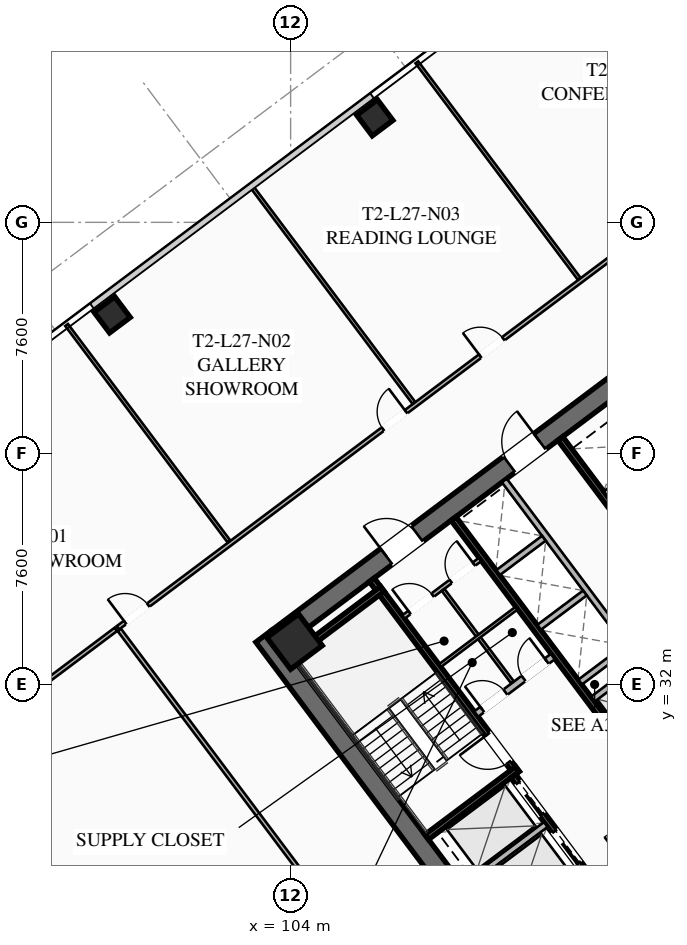
"""IFC4 building model, lengths in metres.
Left out: names, types, materials, properties, quantities, classifications, styles, units other than length and angle.
Written with IfcOpenShell. Run it as: python <this file> out.ifc"""

import sys

from ifc_helpers import new_model, si_unit, direction, frame, frame_2d, origin, origin_2d, place, context, subcontext, project, spatial, rectangle, hollow_rectangle, extrude, element, fill, save


model = new_model("IFC4")
c1 = context("Model", 3, precision=1e-05, world=origin(), true_north=direction((0.0, 1.0)))
c2 = subcontext(c1, "Body", "Model", "MODEL_VIEW")
j1 = project(units=[si_unit("LENGTHUNIT", "METRE"), si_unit("PLANEANGLEUNIT", "RADIAN")], contexts=[c1])
p1 = place(None, origin())
s1 = spatial("IfcSite", under=j1, at=p1, CompositionType="ELEMENT")
p2 = place(p1, origin())
s2 = spatial("IfcBuilding", under=s1, at=p2, CompositionType="ELEMENT")
p3 = place(p2, frame((0.0, 0.0, 102.7)))
s3 = spatial("IfcBuildingStorey", under=s2, at=p3, CompositionType="ELEMENT", Elevation=102.7)
p4 = place(p3, frame((112.476, 21.107, 0.0), z_axis=(0.0, 0.0, 1.0), x_axis=(-0.600005007985, 0.799996243986, 0.0)))
e1 = element("IfcWall", 1, at=p4, inside=s3, PredefinedType="SHEAR", context=c2, shape_type="SweptSolid", body=[
    extrude(rectangle(XDim=15.6, YDim=0.65, at=frame_2d((7.8, 0.0))), origin(), (0.0, 0.0, 1.0), 3.55),
])
p5 = place(p3, frame((124.429, 30.478, 0.0), z_axis=(0.0, 0.0, 1.0), x_axis=(-0.799998028465, -0.600002628705, 0.0)))
e2 = element("IfcWall", 2, at=p5, inside=s3, PredefinedType="SHEAR", context=c2, shape_type="SweptSolid", body=[
    extrude(rectangle(XDim=14.86, YDim=0.65, at=frame_2d((7.43, 0.0))), origin(), (0.0, 0.0, 1.0), 3.55),
])
p6 = place(p5, frame((9.13, 0.0, 0.0)))
e3 = element("IfcOpeningElement", 3, at=p6, cuts=e2, PredefinedType="OPENING", context=c2, shape_type="SweptSolid", body=[
    extrude(rectangle(XDim=1.25, YDim=2.25, at=frame_2d((0.625, 1.125))), frame((0.0, 0.335, 0.0), z_axis=(0.0, -1.0, 0.0), x_axis=(1.0, 0.0, 0.0)), (0.0, 0.0, 1.0), 0.67),
])
p7 = place(p5, frame((4.08, 0.0, 0.0)))
e4 = element("IfcOpeningElement", 4, at=p7, cuts=e2, PredefinedType="OPENING", context=c2, shape_type="SweptSolid", body=[
    extrude(rectangle(XDim=1.25, YDim=2.25, at=frame_2d((0.625, 1.125))), frame((0.0, 0.335, 0.0), z_axis=(0.0, -1.0, 0.0), x_axis=(1.0, 0.0, 0.0)), (0.0, 0.0, 1.0), 0.67),
])
p8 = place(p3, frame((103.571, 33.522, 0.0), z_axis=(0.0, 0.0, 1.0), x_axis=(0.799998028465, 0.600002628705, 0.0)))
e5 = element("IfcWall", 5, at=p8, inside=s3, PredefinedType="SHEAR", context=c2, shape_type="SweptSolid", body=[
    extrude(rectangle(XDim=14.86, YDim=0.65, at=frame_2d((7.43, 0.0))), origin(), (0.0, 0.0, 1.0), 3.55),
])
p9 = place(p8, frame((4.48, 0.0, 0.0)))
e6 = element("IfcOpeningElement", 6, at=p9, cuts=e5, PredefinedType="OPENING", context=c2, shape_type="SweptSolid", body=[
    extrude(rectangle(XDim=1.25, YDim=2.25, at=frame_2d((0.625, 1.125))), frame((0.0, 0.335, 0.0), z_axis=(0.0, -1.0, 0.0), x_axis=(1.0, 0.0, 0.0)), (0.0, 0.0, 1.0), 0.67),
])
p10 = place(p8, frame((9.53, 0.0, 0.0)))
e7 = element("IfcOpeningElement", 7, at=p10, cuts=e5, PredefinedType="OPENING", context=c2, shape_type="SweptSolid", body=[
    extrude(rectangle(XDim=1.25, YDim=2.25, at=frame_2d((0.625, 1.125))), frame((0.0, 0.335, 0.0), z_axis=(0.0, -1.0, 0.0), x_axis=(1.0, 0.0, 0.0)), (0.0, 0.0, 1.0), 0.67),
])
p11 = place(p3, frame((104.13, 33.41, 0.0), z_axis=(0.0, 0.0, 1.0), x_axis=(0.799999996291, 0.600000004945, 0.0)))
e8 = element("IfcColumn", 8, at=p11, inside=s3, PredefinedType="COLUMN", context=c2, shape_type="SweptSolid", body=[
    extrude(hollow_rectangle(XDim=1.3, YDim=1.3, WallThickness=0.05, at=origin_2d()), origin(), (0.0, 0.0, 1.0), 3.35),
])
for number, where, z_axis, x_axis in (
    (9, (106.77, 50.64, 0.0), (0.0, 0.0, 1.0), (0.8, 0.6, 0.0)),
    (10, (98.13, 44.16, 0.0), (0.0, 0.0, 1.0), (0.8, 0.6, 0.0)),
):
    element("IfcColumn", number, at=place(p3, frame(where, z_axis=z_axis, x_axis=x_axis)), inside=s3, PredefinedType="COLUMN", context=c2, shape_type="SweptSolid", body=[
        extrude(hollow_rectangle(XDim=0.85, YDim=0.85, WallThickness=0.035, at=origin_2d()), origin(), (0.0, 0.0, 1.0), 3.35),
    ])
p12 = place(p3, frame((111.44, 29.08, 0.0), z_axis=(0.0, 0.0, 1.0), x_axis=(-0.600009827119, 0.799992629566, 0.0)))
e11 = element("IfcWall", 11, at=p12, inside=s3, PredefinedType="SHEAR", context=c2, shape_type="SweptSolid", body=[
    extrude(rectangle(XDim=7.95, YDim=0.2, at=frame_2d((3.975, 0.0))), origin(), (0.0, 0.0, 1.0), 3.35),
])
p13 = place(p12, frame((0.45, 0.0, 0.0)))
e12 = element("IfcOpeningElement", 12, at=p13, cuts=e11, PredefinedType="OPENING", context=c2, shape_type="SweptSolid", body=[
    extrude(rectangle(XDim=1.15, YDim=2.2, at=frame_2d((0.575, 1.1))), frame((0.0, 0.11, 0.0), z_axis=(0.0, -1.0, 0.0), x_axis=(1.0, 0.0, 0.0)), (0.0, 0.0, 1.0), 0.22),
])
for number, where, z_axis, x_axis in (
    (13, (108.476, 26.982, 0.0), (0.0, 0.0, 1.0), (0.8, 0.6, 0.0)),
    (14, (104.036, 32.902, 0.0), (0.0, 0.0, 1.0), (0.8, 0.6, 0.0)),
):
    element("IfcWall", number, at=place(p3, frame(where, z_axis=z_axis, x_axis=x_axis)), inside=s3, PredefinedType="SHEAR", context=c2, shape_type="SweptSolid", body=[
        extrude(rectangle(XDim=3.73, YDim=0.2, at=frame_2d((1.865, 0.0))), origin(), (0.0, 0.0, 1.0), 3.35),
    ])
p14 = place(p3, frame((117.938, 26.016, 0.0), z_axis=(0.0, 0.0, 1.0), x_axis=(-0.600005463273, 0.799995902516, 0.0)))
e15 = element("IfcWall", 15, at=p14, inside=s3, PredefinedType="SHEAR", context=c2, shape_type="SweptSolid", body=[
    extrude(rectangle(XDim=14.3, YDim=0.2, at=frame_2d((7.15, 0.0))), origin(), (0.0, 0.0, 1.0), 3.35),
])
p15 = place(p3, frame((110.104, 31.028, 0.0), z_axis=(0.0, 0.0, 1.0), x_axis=(0.800018601094, 0.59997519774, 0.0)))
e16 = element("IfcWall", 16, at=p15, inside=s3, PredefinedType="SOLIDWALL", context=c2, shape_type="SweptSolid", body=[
    extrude(rectangle(XDim=3.15, YDim=0.22, at=frame_2d((1.575, 0.0))), origin(), (0.0, 0.0, 1.0), 2.703),
])
p16 = place(p15, frame((0.25, 0.0, 0.0)))
e17 = element("IfcOpeningElement", 17, at=p16, cuts=e16, PredefinedType="OPENING", context=c2, shape_type="SweptSolid", body=[
    extrude(rectangle(XDim=0.95, YDim=2.05, at=frame_2d((0.475, 1.025))), frame((0.0, 0.12, 0.0), z_axis=(0.0, -1.0, 0.0), x_axis=(1.0, 0.0, 0.0)), (0.0, 0.0, 1.0), 0.24),
])
p17 = place(p15, frame((1.95, 0.0, 0.0)))
e18 = element("IfcOpeningElement", 18, at=p17, cuts=e16, PredefinedType="OPENING", context=c2, shape_type="SweptSolid", body=[
    extrude(rectangle(XDim=0.95, YDim=2.05, at=frame_2d((0.475, 1.025))), frame((0.0, 0.12, 0.0), z_axis=(0.0, -1.0, 0.0), x_axis=(1.0, 0.0, 0.0)), (0.0, 0.0, 1.0), 0.24),
])
p18 = place(p3, frame((114.316, 25.412, 0.0), z_axis=(0.0, 0.0, 1.0), x_axis=(0.800018601094, 0.59997519774, 0.0)))
e19 = element("IfcWall", 19, at=p18, inside=s3, PredefinedType="SOLIDWALL", context=c2, shape_type="SweptSolid", body=[
    extrude(rectangle(XDim=3.15, YDim=0.22, at=frame_2d((1.575, 0.0))), origin(), (0.0, 0.0, 1.0), 2.703),
])
p19 = place(p18, frame((0.95, 0.0, 0.0)))
e20 = element("IfcOpeningElement", 20, at=p19, cuts=e19, PredefinedType="OPENING", context=c2, shape_type="SweptSolid", body=[
    extrude(rectangle(XDim=1.25, YDim=2.25, at=frame_2d((0.625, 1.125))), frame((0.0, 0.12, 0.0), z_axis=(0.0, -1.0, 0.0), x_axis=(1.0, 0.0, 0.0)), (0.0, 0.0, 1.0), 0.24),
])
p20 = place(p3, frame((115.13, 23.91, 0.0), z_axis=(0.0, 0.0, 1.0), x_axis=(-0.599975393228, 0.800018454488, 0.0)))
e21 = element("IfcWall", 21, at=p20, inside=s3, PredefinedType="SHEAR", context=c2, shape_type="SweptSolid", body=[
    extrude(rectangle(XDim=6.35, YDim=0.2, at=frame_2d((3.175, 0.0))), origin(), (0.0, 0.0, 1.0), 3.35),
])
p21 = place(p20, frame((4.775, 0.0, 0.0)))
e22 = element("IfcOpeningElement", 22, at=p21, cuts=e21, PredefinedType="OPENING", context=c2, shape_type="SweptSolid", body=[
    extrude(rectangle(XDim=1.3, YDim=2.25, at=frame_2d((0.65, 1.125))), frame((0.0, 0.11, 0.0), z_axis=(0.0, -1.0, 0.0), x_axis=(1.0, 0.0, 0.0)), (0.0, 0.0, 1.0), 0.22),
])
p22 = place(p20, frame((2.775, 0.0, 0.0)))
e23 = element("IfcOpeningElement", 23, at=p22, cuts=e21, PredefinedType="OPENING", context=c2, shape_type="SweptSolid", body=[
    extrude(rectangle(XDim=1.3, YDim=2.25, at=frame_2d((0.65, 1.125))), frame((0.0, 0.11, 0.0), z_axis=(0.0, -1.0, 0.0), x_axis=(1.0, 0.0, 0.0)), (0.0, 0.0, 1.0), 0.22),
])
p23 = place(p20, frame((0.575, 0.0, 0.0)))
e24 = element("IfcOpeningElement", 24, at=p23, cuts=e21, PredefinedType="OPENING", context=c2, shape_type="SweptSolid", body=[
    extrude(rectangle(XDim=1.3, YDim=2.25, at=frame_2d((0.65, 1.125))), frame((0.0, 0.11, 0.0), z_axis=(0.0, -1.0, 0.0), x_axis=(1.0, 0.0, 0.0)), (0.0, 0.0, 1.0), 0.22),
])
p24 = place(p3, frame((109.688, 25.366, 0.0), z_axis=(0.0, 0.0, 1.0), x_axis=(0.8, 0.6, 0.0)))
e25 = element("IfcWall", 25, at=p24, inside=s3, PredefinedType="SOLIDWALL", context=c2, shape_type="SweptSolid", body=[
    extrude(rectangle(XDim=3.38, YDim=0.2, at=frame_2d((1.69, 0.0))), origin(), (0.0, 0.0, 1.0), 3.35),
])
p25 = place(p3, frame((112.87, 40.09, 0.0), z_axis=(0.0, 0.0, 1.0), x_axis=(0.599975393228, -0.800018454488, 0.0)))
e26 = element("IfcWall", 26, at=p25, inside=s3, PredefinedType="SHEAR", context=c2, shape_type="SweptSolid", body=[
    extrude(rectangle(XDim=6.35, YDim=0.2, at=frame_2d((3.175, 0.0))), origin(), (0.0, 0.0, 1.0), 3.35),
])
p26 = place(p3, frame((114.36, 38.27, 0.0), z_axis=(0.0, 0.0, 1.0), x_axis=(0.799973995579, 0.600034670996, 0.0)))
e27 = element("IfcWall", 27, at=p26, inside=s3, PredefinedType="SOLIDWALL", context=c2, shape_type="SweptSolid", body=[
    extrude(rectangle(XDim=3.38, YDim=0.2, at=frame_2d((1.69, 0.0))), origin(), (0.0, 0.0, 1.0), 3.35),
])
p27 = place(p3, frame((107.71, 34.22, 0.0), z_axis=(0.0, 0.0, 1.0), x_axis=(0.799981399002, 0.60002480053, 0.0)))
e28 = element("IfcWall", 28, at=p27, inside=s3, PredefinedType="PARTITIONING", context=c2, shape_type="SweptSolid", body=[
    extrude(rectangle(XDim=3.15, YDim=0.135, at=frame_2d((1.575, 0.0))), origin(), (0.0, 0.0, 1.0), 2.703),
])
p28 = place(p27, frame((0.25, 0.0, 0.0)))
e29 = element("IfcOpeningElement", 29, at=p28, cuts=e28, PredefinedType="OPENING", context=c2, shape_type="SweptSolid", body=[
    extrude(rectangle(XDim=0.95, YDim=2.05, at=frame_2d((0.475, 1.025))), frame((0.0, 0.077, 0.0), z_axis=(0.0, -1.0, 0.0), x_axis=(1.0, 0.0, 0.0)), (0.0, 0.0, 1.0), 0.155),
])
p29 = place(p27, frame((1.95, 0.0, 0.0)))
e30 = element("IfcOpeningElement", 30, at=p29, cuts=e28, PredefinedType="OPENING", context=c2, shape_type="SweptSolid", body=[
    extrude(rectangle(XDim=0.95, YDim=2.05, at=frame_2d((0.475, 1.025))), frame((0.0, 0.077, 0.0), z_axis=(0.0, -1.0, 0.0), x_axis=(1.0, 0.0, 0.0)), (0.0, 0.0, 1.0), 0.155),
])
p30 = place(p3, frame((111.296, 32.072, 0.0), z_axis=(0.0, 0.0, 1.0), x_axis=(-0.59995887973, 0.800030838552, 0.0)))
e31 = element("IfcWall", 31, at=p30, inside=s3, PredefinedType="PARTITIONING", context=c2, shape_type="SweptSolid", body=[
    extrude(rectangle(XDim=3.8, YDim=0.11, at=frame_2d((1.9, 0.0))), origin(), (0.0, 0.0, 1.0), 2.703),
])
p31 = place(p3, frame((108.91, 32.62, 0.0), z_axis=(0.0, 0.0, 1.0), x_axis=(0.800018601094, 0.59997519774, 0.0)))
e32 = element("IfcWall", 32, at=p31, inside=s3, PredefinedType="PARTITIONING", context=c2, shape_type="SweptSolid", body=[
    extrude(rectangle(XDim=3.15, YDim=0.11, at=frame_2d((1.575, 0.0))), origin(), (0.0, 0.0, 1.0), 2.703),
])
p32 = place(p3, frame((113.946, 31.522, 0.0), z_axis=(0.0, 0.0, 1.0), x_axis=(0.8, 0.6, 0.0)))
e33 = element("IfcWall", 33, at=p32, inside=s3, PredefinedType="SOLIDWALL", context=c2, shape_type="SweptSolid", body=[
    extrude(rectangle(XDim=1.88, YDim=0.2, at=frame_2d((0.94, 0.0))), origin(), (0.0, 0.0, 1.0), 3.35),
])
p33 = place(p3, frame((115.11, 33.27, 0.0), z_axis=(0.0, 0.0, 1.0), x_axis=(-0.600011488909, 0.79999138319, 0.0)))
e34 = element("IfcWall", 34, at=p33, inside=s3, PredefinedType="SOLIDWALL", context=c2, shape_type="SweptSolid", body=[
    extrude(rectangle(XDim=6.8, YDim=0.2, at=frame_2d((3.4, 0.0))), origin(), (0.0, 0.0, 1.0), 3.35),
])
p34 = place(p3, frame((113.526, 32.082, 0.0), z_axis=(0.0, 0.0, 1.0), x_axis=(0.800046745961, 0.599937666993, 0.0)))
e35 = element("IfcWall", 35, at=p34, inside=s3, PredefinedType="SOLIDWALL", context=c2, shape_type="SweptSolid", body=[
    extrude(rectangle(XDim=1.88, YDim=0.2, at=frame_2d((0.94, 0.0))), origin(), (0.0, 0.0, 1.0), 3.35),
])
p35 = place(p3, frame((112.176, 33.882, 0.0), z_axis=(0.0, 0.0, 1.0), x_axis=(0.8, 0.6, 0.0)))
e36 = element("IfcWall", 36, at=p35, inside=s3, PredefinedType="SOLIDWALL", context=c2, shape_type="SweptSolid", body=[
    extrude(rectangle(XDim=1.88, YDim=0.2, at=frame_2d((0.94, 0.0))), origin(), (0.0, 0.0, 1.0), 3.35),
])
p36 = place(p3, frame((110.826, 35.682, 0.0), z_axis=(0.0, 0.0, 1.0), x_axis=(0.799984418148, 0.600020775241, 0.0)))
e37 = element("IfcWall", 37, at=p36, inside=s3, PredefinedType="SOLIDWALL", context=c2, shape_type="SweptSolid", body=[
    extrude(rectangle(XDim=1.88, YDim=0.2, at=frame_2d((0.94, 0.0))), origin(), (0.0, 0.0, 1.0), 3.35),
])
p37 = place(p3, frame((98.316, 33.862, 0.0), z_axis=(0.0, 0.0, 1.0), x_axis=(0.8000041147, 0.599994513695, 0.0)))
e38 = element("IfcWall", 38, at=p37, inside=s3, PredefinedType="PARTITIONING", context=c2, shape_type="SweptSolid", body=[
    extrude(rectangle(XDim=28.48, YDim=0.135, at=frame_2d((14.24, 0.0))), origin(), (0.0, 0.0, 1.0), 2.703),
])
p38 = place(p37, frame((0.3, 0.0, 0.0)))
e39 = element("IfcOpeningElement", 39, at=p38, cuts=e38, PredefinedType="OPENING", context=c2, shape_type="SweptSolid", body=[
    extrude(rectangle(XDim=0.95, YDim=2.05, at=frame_2d((0.475, 1.025))), frame((0.0, 0.077, 0.0), z_axis=(0.0, -1.0, 0.0), x_axis=(1.0, 0.0, 0.0)), (0.0, 0.0, 1.0), 0.155),
])
p39 = place(p37, frame((10.9, 0.0, 0.0)))
e40 = element("IfcOpeningElement", 40, at=p39, cuts=e38, PredefinedType="OPENING", context=c2, shape_type="SweptSolid", body=[
    extrude(rectangle(XDim=0.95, YDim=2.05, at=frame_2d((0.475, 1.025))), frame((0.0, 0.077, 0.0), z_axis=(0.0, -1.0, 0.0), x_axis=(1.0, 0.0, 0.0)), (0.0, 0.0, 1.0), 0.155),
])
p40 = place(p37, frame((14.9, 0.0, 0.0)))
e41 = element("IfcOpeningElement", 41, at=p40, cuts=e38, PredefinedType="OPENING", context=c2, shape_type="SweptSolid", body=[
    extrude(rectangle(XDim=0.95, YDim=2.05, at=frame_2d((0.475, 1.025))), frame((0.0, 0.077, 0.0), z_axis=(0.0, -1.0, 0.0), x_axis=(1.0, 0.0, 0.0)), (0.0, 0.0, 1.0), 0.155),
])
p41 = place(p37, frame((27.23, 0.0, 0.0)))
e42 = element("IfcOpeningElement", 42, at=p41, cuts=e38, PredefinedType="OPENING", context=c2, shape_type="SweptSolid", body=[
    extrude(rectangle(XDim=0.95, YDim=2.05, at=frame_2d((0.475, 1.025))), frame((0.0, 0.077, 0.0), z_axis=(0.0, -1.0, 0.0), x_axis=(1.0, 0.0, 0.0)), (0.0, 0.0, 1.0), 0.155),
])
p42 = place(p3, frame((101.972, 36.704, 0.0), z_axis=(0.0, 0.0, 1.0), x_axis=(-0.59999561085, 0.800003291844, 0.0)))
e43 = element("IfcWall", 43, at=p42, inside=s3, PredefinedType="PARTITIONING", context=c2, shape_type="SweptSolid", body=[
    extrude(rectangle(XDim=8.9, YDim=0.11, at=frame_2d((4.45, 0.0))), origin(), (0.0, 0.0, 1.0), 2.703),
])
p43 = place(p3, frame((108.052, 41.264, 0.0), z_axis=(0.0, 0.0, 1.0), x_axis=(-0.6, 0.8, 0.0)))
e44 = element("IfcWall", 44, at=p43, inside=s3, PredefinedType="PARTITIONING", context=c2, shape_type="SweptSolid", body=[
    extrude(rectangle(XDim=8.9, YDim=0.11, at=frame_2d((4.45, 0.0))), origin(), (0.0, 0.0, 1.0), 2.703),
])
p44 = place(p3, frame((113.492, 45.344, 0.0), z_axis=(0.0, 0.0, 1.0), x_axis=(-0.599982443676, 0.800013166942, 0.0)))
e45 = element("IfcWall", 45, at=p44, inside=s3, PredefinedType="PARTITIONING", context=c2, shape_type="SweptSolid", body=[
    extrude(rectangle(XDim=8.9, YDim=0.11, at=frame_2d((4.45, 0.0))), origin(), (0.0, 0.0, 1.0), 2.703),
])
p45 = place(p3, frame((134.462, 33.134, 0.0), z_axis=(0.0, 0.0, 1.0), x_axis=(-0.799996913945, -0.600004114717, 0.0)))
e46 = element("IfcWall", 46, at=p45, inside=s3, PredefinedType="PARTITIONING", context=c2, shape_type="SweptSolid", body=[
    extrude(rectangle(XDim=28.48, YDim=0.135, at=frame_2d((14.24, 0.0))), origin(), (0.0, 0.0, 1.0), 2.703),
])
p46 = place(p45, frame((27.15, 0.0, 0.0)))
e47 = element("IfcOpeningElement", 47, at=p46, cuts=e46, PredefinedType="OPENING", context=c2, shape_type="SweptSolid", body=[
    extrude(rectangle(XDim=0.95, YDim=2.05, at=frame_2d((0.475, 1.025))), frame((0.0, 0.077, 0.0), z_axis=(0.0, -1.0, 0.0), x_axis=(1.0, 0.0, 0.0)), (0.0, 0.0, 1.0), 0.155),
])
p47 = place(p45, frame((16.321, 0.0, 0.0)))
e48 = element("IfcOpeningElement", 48, at=p47, cuts=e46, PredefinedType="OPENING", context=c2, shape_type="SweptSolid", body=[
    extrude(rectangle(XDim=0.95, YDim=2.05, at=frame_2d((0.475, 1.025))), frame((0.0, 0.077, 0.0), z_axis=(0.0, -1.0, 0.0), x_axis=(1.0, 0.0, 0.0)), (0.0, 0.0, 1.0), 0.155),
])
p48 = place(p45, frame((12.529, 0.0, 0.0)))
e49 = element("IfcOpeningElement", 49, at=p48, cuts=e46, PredefinedType="OPENING", context=c2, shape_type="SweptSolid", body=[
    extrude(rectangle(XDim=0.95, YDim=2.05, at=frame_2d((0.475, 1.025))), frame((0.0, 0.077, 0.0), z_axis=(0.0, -1.0, 0.0), x_axis=(1.0, 0.0, 0.0)), (0.0, 0.0, 1.0), 0.155),
])
p49 = place(p45, frame((0.38, 0.0, 0.0)))
e50 = element("IfcOpeningElement", 50, at=p49, cuts=e46, PredefinedType="OPENING", context=c2, shape_type="SweptSolid", body=[
    extrude(rectangle(XDim=0.95, YDim=2.05, at=frame_2d((0.475, 1.025))), frame((0.0, 0.077, 0.0), z_axis=(0.0, -1.0, 0.0), x_axis=(1.0, 0.0, 0.0)), (0.0, 0.0, 1.0), 0.155),
])
p50 = place(p3, frame((111.63, 16.11, 0.0), z_axis=(0.0, 0.0, 1.0), x_axis=(-0.599996466511, 0.800002650104, 0.0)))
e51 = element("IfcWall", 51, at=p50, inside=s3, PredefinedType="PARTITIONING", context=c2, shape_type="SweptSolid", body=[
    extrude(rectangle(XDim=22.11, YDim=0.135, at=frame_2d((11.055, 0.0))), origin(), (0.0, 0.0, 1.0), 2.703),
])
p51 = place(p50, frame((0.3, 0.0, 0.0)))
e52 = element("IfcOpeningElement", 52, at=p51, cuts=e51, PredefinedType="OPENING", context=c2, shape_type="SweptSolid", body=[
    extrude(rectangle(XDim=0.95, YDim=2.05, at=frame_2d((0.475, 1.025))), frame((0.0, 0.077, 0.0), z_axis=(0.0, -1.0, 0.0), x_axis=(1.0, 0.0, 0.0)), (0.0, 0.0, 1.0), 0.155),
])
p52 = place(p3, frame((98.252, 33.814, 0.0), z_axis=(0.0, 0.0, 1.0), x_axis=(-0.800003500202, -0.599995333035, 0.0)))
e53 = element("IfcWall", 53, at=p52, inside=s3, PredefinedType="PARTITIONING", context=c2, shape_type="SweptSolid", body=[
    extrude(rectangle(XDim=8.37, YDim=0.135, at=frame_2d((4.185, 0.0))), origin(), (0.0, 0.0, 1.0), 2.703),
])
p53 = place(p9, origin())
e54 = element("IfcDoor", 54, at=p53, inside=s3, OperationType="SINGLE_SWING_LEFT", PredefinedType="DOOR", context=c2, shape_type="SweptSolid", body=[
    extrude(rectangle(XDim=1.25, YDim=2.25, at=frame_2d((0.625, 1.125))), frame((0.0, 0.025, 0.0), z_axis=(0.0, -1.0, 0.0), x_axis=(1.0, 0.0, 0.0)), (0.0, 0.0, 1.0), 0.05),
])
fill(e6, e54)
p54 = place(p10, origin())
e55 = element("IfcDoor", 55, at=p54, inside=s3, OperationType="SINGLE_SWING_RIGHT", PredefinedType="DOOR", context=c2, shape_type="SweptSolid", body=[
    extrude(rectangle(XDim=1.25, YDim=2.25, at=frame_2d((0.625, 1.125))), frame((0.0, 0.025, 0.0), z_axis=(0.0, -1.0, 0.0), x_axis=(1.0, 0.0, 0.0)), (0.0, 0.0, 1.0), 0.05),
])
fill(e7, e55)
p55 = place(p13, origin())
e56 = element("IfcDoor", 56, at=p55, inside=s3, OperationType="SINGLE_SWING_RIGHT", PredefinedType="DOOR", context=c2, shape_type="SweptSolid", body=[
    extrude(rectangle(XDim=1.15, YDim=2.2, at=frame_2d((0.575, 1.1))), frame((0.0, 0.025, 0.0), z_axis=(0.0, -1.0, 0.0), x_axis=(1.0, 0.0, 0.0)), (0.0, 0.0, 1.0), 0.05),
])
fill(e12, e56)
p56 = place(p28, origin())
e57 = element("IfcDoor", 57, at=p56, inside=s3, OperationType="SINGLE_SWING_LEFT", PredefinedType="DOOR", context=c2, shape_type="SweptSolid", body=[
    extrude(rectangle(XDim=0.95, YDim=2.05, at=frame_2d((0.475, 1.025))), frame((0.0, 0.025, 0.0), z_axis=(0.0, -1.0, 0.0), x_axis=(1.0, 0.0, 0.0)), (0.0, 0.0, 1.0), 0.05),
])
fill(e29, e57)
p57 = place(p29, origin())
e58 = element("IfcDoor", 58, at=p57, inside=s3, OperationType="SINGLE_SWING_RIGHT", PredefinedType="DOOR", context=c2, shape_type="SweptSolid", body=[
    extrude(rectangle(XDim=0.95, YDim=2.05, at=frame_2d((0.475, 1.025))), frame((0.0, 0.025, 0.0), z_axis=(0.0, -1.0, 0.0), x_axis=(1.0, 0.0, 0.0)), (0.0, 0.0, 1.0), 0.05),
])
fill(e30, e58)
p58 = place(p16, origin())
e59 = element("IfcDoor", 59, at=p58, inside=s3, OperationType="SINGLE_SWING_LEFT", PredefinedType="DOOR", context=c2, shape_type="SweptSolid", body=[
    extrude(rectangle(XDim=0.95, YDim=2.05, at=frame_2d((0.475, 1.025))), frame((0.0, 0.025, 0.0), z_axis=(0.0, -1.0, 0.0), x_axis=(1.0, 0.0, 0.0)), (0.0, 0.0, 1.0), 0.05),
])
fill(e17, e59)
p59 = place(p17, origin())
e60 = element("IfcDoor", 60, at=p59, inside=s3, OperationType="SINGLE_SWING_RIGHT", PredefinedType="DOOR", context=c2, shape_type="SweptSolid", body=[
    extrude(rectangle(XDim=0.95, YDim=2.05, at=frame_2d((0.475, 1.025))), frame((0.0, 0.025, 0.0), z_axis=(0.0, -1.0, 0.0), x_axis=(1.0, 0.0, 0.0)), (0.0, 0.0, 1.0), 0.05),
])
fill(e18, e60)
p60 = place(p38, origin())
e61 = element("IfcDoor", 61, at=p60, inside=s3, OperationType="SINGLE_SWING_LEFT", PredefinedType="DOOR", context=c2, shape_type="SweptSolid", body=[
    extrude(rectangle(XDim=0.95, YDim=2.05, at=frame_2d((0.475, 1.025))), frame((0.0, 0.025, 0.0), z_axis=(0.0, -1.0, 0.0), x_axis=(1.0, 0.0, 0.0)), (0.0, 0.0, 1.0), 0.05),
])
fill(e39, e61)
p61 = place(p39, origin())
e62 = element("IfcDoor", 62, at=p61, inside=s3, OperationType="SINGLE_SWING_RIGHT", PredefinedType="DOOR", context=c2, shape_type="SweptSolid", body=[
    extrude(rectangle(XDim=0.95, YDim=2.05, at=frame_2d((0.475, 1.025))), frame((0.0, 0.025, 0.0), z_axis=(0.0, -1.0, 0.0), x_axis=(1.0, 0.0, 0.0)), (0.0, 0.0, 1.0), 0.05),
])
fill(e40, e62)
p62 = place(p40, origin())
e63 = element("IfcDoor", 63, at=p62, inside=s3, OperationType="SINGLE_SWING_LEFT", PredefinedType="DOOR", context=c2, shape_type="SweptSolid", body=[
    extrude(rectangle(XDim=0.95, YDim=2.05, at=frame_2d((0.475, 1.025))), frame((0.0, 0.025, 0.0), z_axis=(0.0, -1.0, 0.0), x_axis=(1.0, 0.0, 0.0)), (0.0, 0.0, 1.0), 0.05),
])
fill(e41, e63)
p63 = place(p21, origin())
e64 = element("IfcDoor", 64, at=p63, inside=s3, OperationType="SLIDING_TO_LEFT", PredefinedType="DOOR", context=c2, shape_type="SweptSolid", body=[
    extrude(rectangle(XDim=1.3, YDim=2.25, at=frame_2d((0.65, 1.125))), frame((0.0, 0.025, 0.0), z_axis=(0.0, -1.0, 0.0), x_axis=(1.0, 0.0, 0.0)), (0.0, 0.0, 1.0), 0.05),
])
fill(e22, e64)
p64 = place(p22, origin())
e65 = element("IfcDoor", 65, at=p64, inside=s3, OperationType="SLIDING_TO_LEFT", PredefinedType="DOOR", context=c2, shape_type="SweptSolid", body=[
    extrude(rectangle(XDim=1.3, YDim=2.25, at=frame_2d((0.65, 1.125))), frame((0.0, 0.025, 0.0), z_axis=(0.0, -1.0, 0.0), x_axis=(1.0, 0.0, 0.0)), (0.0, 0.0, 1.0), 0.05),
])
fill(e23, e65)
save(model, sys.argv[1])
